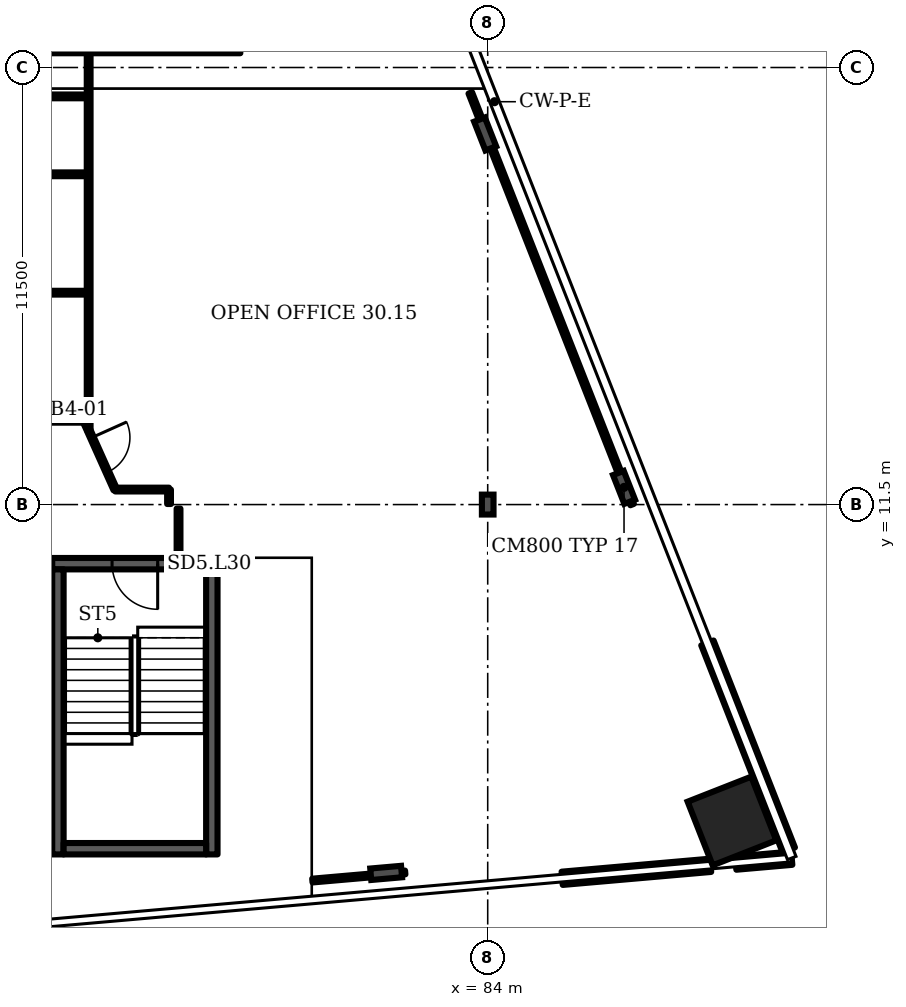
"""IFC4 building model, lengths in metres.
Left out: names, types, materials, properties, quantities, classifications, styles, units other than length and angle.
Written with IfcOpenShell. Run it as: python <this file> out.ifc"""

import sys

from ifc_helpers import new_model, si_unit, direction, frame, frame_2d, origin, origin_2d, place, context, subcontext, project, spatial, rectangle, i_section, extrude, element, fill, save


model = new_model("IFC4")
c1 = context("Model", 3, precision=1e-05, world=origin(), true_north=direction((0.0, 1.0)))
c2 = subcontext(c1, "Body", "Model", "MODEL_VIEW")
j1 = project(units=[si_unit("LENGTHUNIT", "METRE"), si_unit("PLANEANGLEUNIT", "RADIAN")], contexts=[c1])
p1 = place(None, origin())
s1 = spatial("IfcSite", under=j1, at=p1, CompositionType="ELEMENT")
p2 = place(p1, origin())
s2 = spatial("IfcBuilding", under=s1, at=p2, CompositionType="ELEMENT")
p3 = place(p2, frame((0.0, 0.0, 129.1)))
s3 = spatial("IfcBuildingStorey", under=s2, at=p3, CompositionType="ELEMENT", Elevation=129.1)
p4 = place(p3, frame((90.427, 3.174, 0.0), z_axis=(0.0, 0.0, 1.0), x_axis=(-0.365778, 0.930702, 0.0)))
e1 = element("IfcColumn", 1, at=p4, inside=s3, PredefinedType="COLUMN", context=c2, shape_type="SweptSolid", body=[
    extrude(rectangle(XDim=1.8, YDim=1.8, at=origin_2d()), origin(), (0.0, 0.0, 1.0), 3.6),
])
for number, where, z_axis, x_axis in (
    (2, (81.328, 1.808, 0.0), (0.0, 0.0, 1.0), (0.087, -0.996, 0.0)),
    (3, (87.587, 11.952, 0.0), (0.0, 0.0, 1.0), (0.931, 0.366, 0.0)),
    (4, (83.933, 21.251, 0.0), (0.0, 0.0, 1.0), (0.931, 0.366, 0.0)),
):
    element("IfcColumn", number, at=place(p3, frame(where, z_axis=z_axis, x_axis=x_axis)), inside=s3, PredefinedType="COLUMN", context=c2, shape_type="SweptSolid", body=[
        extrude(i_section(OverallWidth=0.303, OverallDepth=0.814, WebThickness=0.021, FlangeThickness=0.04, FilletRadius=0.03, at=origin_2d()), origin(), (0.0, 0.0, 1.0), 3.6),
    ])
p5 = place(p3, frame((84.0, 11.5, 0.0), z_axis=(0.0, 0.0, 1.0), x_axis=(1.0, 0.0, 0.0)))
e5 = element("IfcColumn", 5, at=p5, inside=s3, PredefinedType="COLUMN", context=c2, shape_type="SweptSolid", body=[
    extrude(i_section(OverallWidth=0.306, OverallDepth=0.524, WebThickness=0.021, FlangeThickness=0.04, FilletRadius=0.027, at=origin_2d()), origin(), (0.0, 0.0, 1.0), 3.6),
])
p6 = place(p3, frame((85.959, 1.667, 0.0), z_axis=(0.0, 0.0, 1.0), x_axis=(0.996194, 0.087167, 0.0)))
e6 = element("IfcWall", 6, at=p6, inside=s3, PredefinedType="SOLIDWALL", context=c2, shape_type="SweptSolid", body=[
    extrude(rectangle(XDim=3.921, YDim=0.35, at=frame_2d((1.96, 0.0))), origin(), (0.0, 0.0, 1.0), 1.0),
])
p7 = place(p3, frame((90.527, 2.066, 0.0), z_axis=(0.0, 0.0, 1.0), x_axis=(0.996198, 0.087157, 0.0)))
e7 = element("IfcWall", 7, at=p7, inside=s3, PredefinedType="SOLIDWALL", context=c2, shape_type="SweptSolid", body=[
    extrude(rectangle(XDim=1.479, YDim=0.35, at=frame_2d((0.74, 0.0))), origin(), (0.0, 0.0, 1.0), 1.0),
])
p8 = place(p3, frame((91.921, 2.414, 0.0), z_axis=(0.0, 0.0, 1.0), x_axis=(-0.36578, 0.930701, 0.0)))
e8 = element("IfcWall", 8, at=p8, inside=s3, PredefinedType="SOLIDWALL", context=c2, shape_type="SweptSolid", body=[
    extrude(rectangle(XDim=5.852, YDim=0.35, at=frame_2d((2.926, 0.0))), origin(), (0.0, 0.0, 1.0), 1.0),
])
p9 = place(p3, frame((72.541, 9.945, 0.0), z_axis=(0.0, 0.0, 1.0), x_axis=(1.0, 0.0, 0.0)))
e9 = element("IfcWall", 9, at=p9, inside=s3, PredefinedType="SHEAR", context=c2, shape_type="SweptSolid", body=[
    extrude(rectangle(XDim=4.35, YDim=0.3, at=frame_2d((2.175, 0.0))), origin(), (0.0, 0.0, 1.0), 3.2),
])
p10 = place(p9, frame((1.575, 0.0, 0.0)))
e10 = element("IfcOpeningElement", 10, at=p10, cuts=e9, PredefinedType="OPENING", context=c2, shape_type="SweptSolid", body=[
    extrude(rectangle(XDim=1.2, YDim=2.1, at=frame_2d((0.6, 1.05))), frame((0.0, 0.16, 0.0), z_axis=(0.0, -1.0, 0.0), x_axis=(1.0, 0.0, 0.0)), (0.0, 0.0, 1.0), 0.32),
])
p11 = place(p3, frame((65.91, 13.705, 0.0), z_axis=(0.0, 0.0, 1.0), x_axis=(1.0, 0.0, 0.0)))
e11 = element("IfcWall", 11, at=p11, inside=s3, PredefinedType="PARTITIONING", context=c2, shape_type="SweptSolid", body=[
    extrude(rectangle(XDim=7.49, YDim=0.1, at=frame_2d((3.745, 0.0))), origin(), (0.0, 0.0, 1.0), 3.2),
])
p12 = place(p3, frame((65.91, 22.24, 0.0), z_axis=(0.0, 0.0, 1.0), x_axis=(1.0, 0.0, 0.0)))
e12 = element("IfcWall", 12, at=p12, inside=s3, PredefinedType="PARTITIONING", context=c2, shape_type="SweptSolid", body=[
    extrude(rectangle(XDim=7.59, YDim=0.1, at=frame_2d((3.795, 0.0))), origin(), (0.0, 0.0, 1.0), 3.2),
])
for number, where, z_axis, x_axis in (
    (13, (67.71, 17.075, 0.0), (0.0, 0.0, 1.0), (1.0, 0.0, 0.0)),
    (14, (67.71, 20.19, 0.0), (0.0, 0.0, 1.0), (1.0, 0.0, 0.0)),
):
    element("IfcWall", number, at=place(p3, frame(where, z_axis=z_axis, x_axis=x_axis)), inside=s3, PredefinedType="PARTITIONING", context=c2, shape_type="SweptSolid", body=[
        extrude(rectangle(XDim=5.79, YDim=0.1, at=frame_2d((2.895, 0.0))), origin(), (0.0, 0.0, 1.0), 3.2),
    ])
p13 = place(p3, frame((73.49, 13.48, 0.0), z_axis=(0.0, 0.0, 1.0), x_axis=(-0.419275, 0.907861, 0.0)))
e15 = element("IfcWall", 15, at=p13, inside=s3, PredefinedType="PARTITIONING", context=c2, shape_type="SweptSolid", body=[
    extrude(rectangle(XDim=0.215, YDim=0.1, at=frame_2d((0.107, 0.0))), origin(), (0.0, 0.0, 1.0), 3.2),
])
p14 = place(p3, frame((73.5, 13.48, 0.0), z_axis=(0.0, 0.0, 1.0), x_axis=(0.0, 1.0, 0.0)))
e16 = element("IfcWall", 16, at=p14, inside=s3, PredefinedType="PARTITIONING", context=c2, shape_type="SweptSolid", body=[
    extrude(rectangle(XDim=9.895, YDim=0.1, at=frame_2d((4.948, 0.0))), origin(), (0.0, 0.0, 1.0), 3.2),
])
p15 = place(p3, frame((74.2, 11.895, 0.0), z_axis=(0.0, 0.0, 1.0), x_axis=(-0.409356, 0.912377, 0.0)))
e17 = element("IfcWall", 17, at=p15, inside=s3, PredefinedType="PARTITIONING", context=c2, shape_type="SweptSolid", body=[
    extrude(rectangle(XDim=1.71, YDim=0.1, at=frame_2d((0.855, 0.0))), origin(), (0.0, 0.0, 1.0), 3.2),
])
p16 = place(p15, frame((0.5, 0.0, 0.0)))
e18 = element("IfcOpeningElement", 18, at=p16, cuts=e17, PredefinedType="OPENING", context=c2, shape_type="SweptSolid", body=[
    extrude(rectangle(XDim=1.0, YDim=2.1, at=frame_2d((0.5, 1.05))), frame((0.0, 0.06, 0.0), z_axis=(0.0, -1.0, 0.0), x_axis=(1.0, 0.0, 0.0)), (0.0, 0.0, 1.0), 0.12),
])
p17 = place(p3, frame((74.2, 11.895, 0.0), z_axis=(0.0, 0.0, 1.0), x_axis=(1.0, 0.0, 0.0)))
e19 = element("IfcWall", 19, at=p17, inside=s3, PredefinedType="PARTITIONING", context=c2, shape_type="SweptSolid", body=[
    extrude(rectangle(XDim=1.415, YDim=0.1, at=frame_2d((0.708, 0.0))), origin(), (0.0, 0.0, 1.0), 3.2),
])
p18 = place(p3, frame((75.615, 11.515, 0.0), z_axis=(0.0, 0.0, 1.0), x_axis=(0.0, 1.0, 0.0)))
e20 = element("IfcWall", 20, at=p18, inside=s3, PredefinedType="PARTITIONING", context=c2, shape_type="SweptSolid", body=[
    extrude(rectangle(XDim=0.38, YDim=0.1, at=frame_2d((0.19, 0.0))), origin(), (0.0, 0.0, 1.0), 3.2),
])
p19 = place(p3, frame((75.865, 10.115, 0.0), z_axis=(0.0, 0.0, 1.0), x_axis=(0.0, 1.0, 0.0)))
e21 = element("IfcWall", 21, at=p19, inside=s3, PredefinedType="PARTITIONING", context=c2, shape_type="SweptSolid", body=[
    extrude(rectangle(XDim=1.28, YDim=0.1, at=frame_2d((0.64, 0.0))), origin(), (0.0, 0.0, 1.0), 3.2),
])
p20 = place(p3, frame((79.386, 1.607, 0.0), z_axis=(0.0, 0.0, 1.0), x_axis=(0.996209, 0.086973, 0.0)))
e22 = element("IfcWall", 22, at=p20, inside=s3, PredefinedType="PARTITIONING", context=c2, shape_type="SweptSolid", body=[
    extrude(rectangle(XDim=2.453, YDim=0.1, at=frame_2d((1.227, 0.0))), origin(), (0.0, 0.0, 1.0), 2.58),
])
p21 = place(p3, frame((87.8, 11.5, 0.0), z_axis=(0.0, 0.0, 1.0), x_axis=(-0.365866, 0.930668, 0.0)))
e23 = element("IfcWall", 23, at=p21, inside=s3, PredefinedType="PARTITIONING", context=c2, shape_type="SweptSolid", body=[
    extrude(rectangle(XDim=11.64, YDim=0.1, at=frame_2d((5.82, 0.0))), origin(), (0.0, 0.0, 1.0), 2.58),
])
for number, where, z_axis, x_axis in (
    (24, (72.691, 2.295, 0.0), (0.0, 0.0, 1.0), (0.0, 1.0, 0.0)),
    (25, (76.741, 2.295, 0.0), (0.0, 0.0, 1.0), (0.0, 1.0, 0.0)),
):
    element("IfcWall", number, at=place(p3, frame(where, z_axis=z_axis, x_axis=x_axis)), inside=s3, PredefinedType="SHEAR", context=c2, shape_type="SweptSolid", body=[
        extrude(rectangle(XDim=7.5, YDim=0.3, at=frame_2d((3.75, 0.0))), origin(), (0.0, 0.0, 1.0), 3.2),
    ])
p22 = place(p3, frame((72.841, 2.445, 0.0), z_axis=(0.0, 0.0, 1.0), x_axis=(1.0, 0.0, 0.0)))
e26 = element("IfcWall", 26, at=p22, inside=s3, PredefinedType="SHEAR", context=c2, shape_type="SweptSolid", body=[
    extrude(rectangle(XDim=3.75, YDim=0.3, at=frame_2d((1.875, 0.0))), origin(), (0.0, 0.0, 1.0), 3.2),
])
p23 = place(p3, frame((69.99, 23.525, 0.0), z_axis=(0.0, 0.0, 1.0), x_axis=(1.0, 0.0, 0.0)))
e27 = element("IfcWall", 27, at=p23, inside=s3, PredefinedType="SHEAR", context=c2, shape_type="SweptSolid", body=[
    extrude(rectangle(XDim=7.5, YDim=0.3, at=frame_2d((3.75, 0.0))), origin(), (0.0, 0.0, 1.0), 3.2),
])
p24 = place(p10, origin())
e28 = element("IfcDoor", 28, at=p24, inside=s3, OperationType="SINGLE_SWING_RIGHT", PredefinedType="DOOR", context=c2, shape_type="SweptSolid", body=[
    extrude(rectangle(XDim=1.2, YDim=2.1, at=frame_2d((0.6, 1.05))), frame((0.0, 0.025, 0.0), z_axis=(0.0, -1.0, 0.0), x_axis=(1.0, 0.0, 0.0)), (0.0, 0.0, 1.0), 0.05),
])
fill(e10, e28)
p25 = place(p16, origin())
e29 = element("IfcDoor", 29, at=p25, inside=s3, OperationType="SINGLE_SWING_RIGHT", PredefinedType="DOOR", context=c2, shape_type="SweptSolid", body=[
    extrude(rectangle(XDim=1.0, YDim=2.1, at=frame_2d((0.5, 1.05))), frame((0.0, 0.025, 0.0), z_axis=(0.0, -1.0, 0.0), x_axis=(1.0, 0.0, 0.0)), (0.0, 0.0, 1.0), 0.05),
])
fill(e18, e29)
save(model, sys.argv[1])
